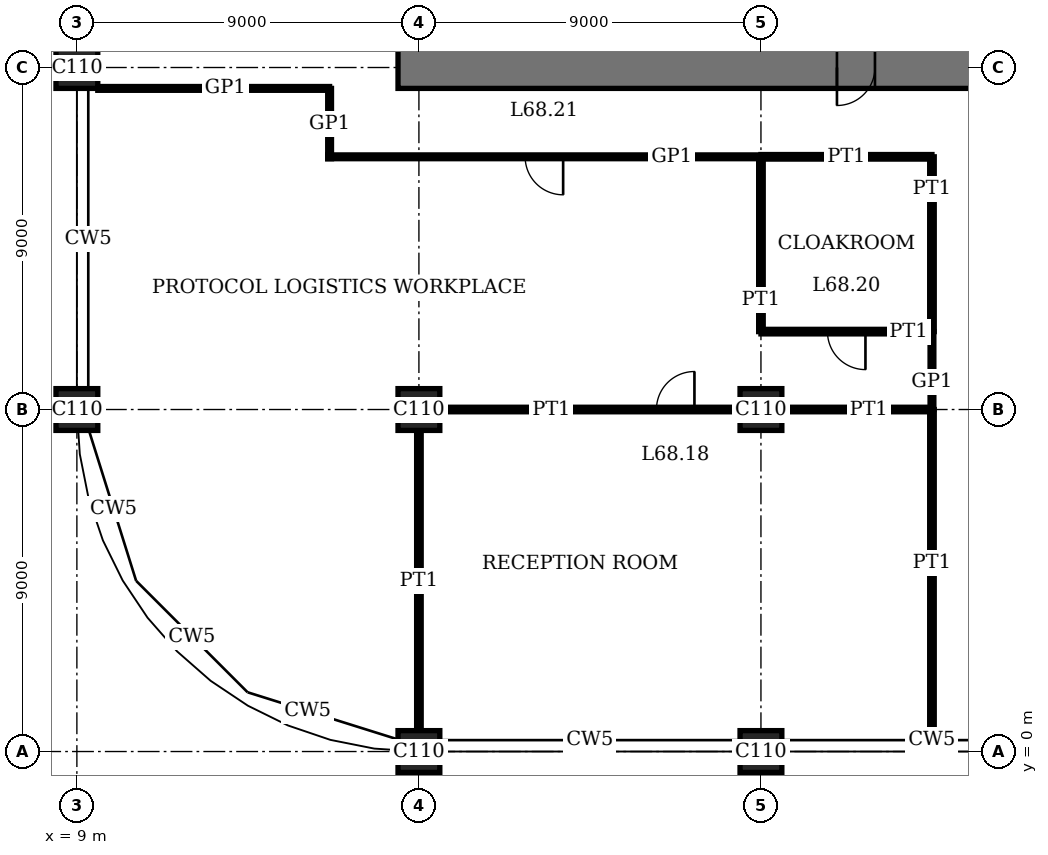
"""IFC4 building model, lengths in metres.
Left out: names, types, materials, properties, quantities, classifications, styles, units other than length and angle.
Written with IfcOpenShell. Run it as: python <this file> out.ifc"""

import sys

from ifc_helpers import new_model, si_unit, direction, frame, frame_2d, origin, origin_2d, place, context, subcontext, project, spatial, rectangle, extrude, element, fill, save


model = new_model("IFC4")
c1 = context("Model", 3, precision=1e-05, world=origin(), true_north=direction((0.0, 1.0)))
c2 = subcontext(c1, "Body", "Model", "MODEL_VIEW")
j1 = project(units=[si_unit("LENGTHUNIT", "METRE"), si_unit("PLANEANGLEUNIT", "RADIAN")], contexts=[c1])
p1 = place(None, origin())
s1 = spatial("IfcSite", under=j1, at=p1, CompositionType="ELEMENT")
p2 = place(p1, origin())
s2 = spatial("IfcBuilding", under=s1, at=p2, CompositionType="ELEMENT")
p3 = place(p2, frame((0.0, 0.0, 279.4)))
s3 = spatial("IfcBuildingStorey", under=s2, at=p3, CompositionType="ELEMENT", Elevation=279.4)
for number, where, z_axis, x_axis in (
    (1, (9.0, 9.0, 0.0), (0.0, 0.0, 1.0), (1.0, 0.0, 0.0)),
    (2, (9.0, 18.0, 0.0), (0.0, 0.0, 1.0), (1.0, 0.0, 0.0)),
    (3, (18.0, 0.0, 0.0), (0.0, 0.0, 1.0), (1.0, 0.0, 0.0)),
    (4, (18.0, 9.0, 0.0), (0.0, 0.0, 1.0), (1.0, 0.0, 0.0)),
    (5, (27.0, 0.0, 0.0), (0.0, 0.0, 1.0), (1.0, 0.0, 0.0)),
    (6, (27.0, 9.0, 0.0), (0.0, 0.0, 1.0), (1.0, 0.0, 0.0)),
):
    element("IfcColumn", number, at=place(p3, frame(where, z_axis=z_axis, x_axis=x_axis)), inside=s3, PredefinedType="COLUMN", context=c2, shape_type="SweptSolid", body=[
        extrude(rectangle(XDim=1.1, YDim=1.1, at=origin_2d()), origin(), (0.0, 0.0, 1.0), 4.0),
    ])
p4 = place(p3, frame((17.45, 18.0, 0.0), z_axis=(0.0, 0.0, 1.0), x_axis=(1.0, 0.0, 0.0)))
e7 = element("IfcWall", 7, at=p4, inside=s3, PredefinedType="SHEAR", context=c2, shape_type="SweptSolid", body=[
    extrude(rectangle(XDim=28.1, YDim=1.1, at=frame_2d((14.05, 0.0))), origin(), (0.0, 0.0, 1.0), 4.0),
])
p5 = place(p4, frame((11.55, 0.0, 0.0)))
e8 = element("IfcOpeningElement", 8, at=p5, cuts=e7, PredefinedType="OPENING", context=c2, shape_type="SweptSolid", body=[
    extrude(rectangle(XDim=1.0, YDim=2.4, at=frame_2d((0.5, 1.2))), frame((0.0, 0.56, 0.0), z_axis=(0.0, -1.0, 0.0), x_axis=(1.0, 0.0, 0.0)), (0.0, 0.0, 1.0), 1.12),
])
p6 = place(p4, frame((16.55, 0.0, 0.0)))
e9 = element("IfcOpeningElement", 9, at=p6, cuts=e7, PredefinedType="OPENING", context=c2, shape_type="SweptSolid", body=[
    extrude(rectangle(XDim=1.0, YDim=2.4, at=frame_2d((0.5, 1.2))), frame((0.0, 0.56, 0.0), z_axis=(0.0, -1.0, 0.0), x_axis=(1.0, 0.0, 0.0)), (0.0, 0.0, 1.0), 1.12),
])
p7 = place(p4, frame((20.0, 0.0, 0.0)))
e10 = element("IfcOpeningElement", 10, at=p7, cuts=e7, PredefinedType="OPENING", context=c2, shape_type="SweptSolid", body=[
    extrude(rectangle(XDim=1.1, YDim=2.4, at=frame_2d((0.55, 1.2))), frame((0.0, 0.56, 0.0), z_axis=(0.0, -1.0, 0.0), x_axis=(1.0, 0.0, 0.0)), (0.0, 0.0, 1.0), 1.12),
])
p8 = place(p4, frame((24.05, 0.0, 0.0)))
e11 = element("IfcOpeningElement", 11, at=p8, cuts=e7, PredefinedType="OPENING", context=c2, shape_type="SweptSolid", body=[
    extrude(rectangle(XDim=1.0, YDim=2.4, at=frame_2d((0.5, 1.2))), frame((0.0, 0.56, 0.0), z_axis=(0.0, -1.0, 0.0), x_axis=(1.0, 0.0, 0.0)), (0.0, 0.0, 1.0), 1.12),
])
p9 = place(p3, frame((18.55, 9.0, 0.0), z_axis=(0.0, 0.0, 1.0), x_axis=(1.0, 0.0, 0.0)))
e12 = element("IfcWall", 12, at=p9, inside=s3, PredefinedType="PARTITIONING", context=c2, shape_type="SweptSolid", body=[
    extrude(rectangle(XDim=7.9, YDim=0.12, at=frame_2d((3.95, 0.0))), origin(), (0.0, 0.0, 1.0), 3.05),
])
p10 = place(p9, frame((5.7, 0.0, 0.0)))
e13 = element("IfcOpeningElement", 13, at=p10, cuts=e12, PredefinedType="OPENING", context=c2, shape_type="SweptSolid", body=[
    extrude(rectangle(XDim=1.0, YDim=2.4, at=frame_2d((0.5, 1.2))), frame((0.0, 0.07, 0.0), z_axis=(0.0, -1.0, 0.0), x_axis=(1.0, 0.0, 0.0)), (0.0, 0.0, 1.0), 0.14),
])
p11 = place(p3, frame((27.55, 9.0, 0.0), z_axis=(0.0, 0.0, 1.0), x_axis=(1.0, 0.0, 0.0)))
e14 = element("IfcWall", 14, at=p11, inside=s3, PredefinedType="PARTITIONING", context=c2, shape_type="SweptSolid", body=[
    extrude(rectangle(XDim=3.95, YDim=0.12, at=frame_2d((1.975, 0.0))), origin(), (0.0, 0.0, 1.0), 3.05),
])
p12 = place(p3, frame((27.0, 11.05, 0.0), z_axis=(0.0, 0.0, 1.0), x_axis=(1.0, 0.0, 0.0)))
e15 = element("IfcWall", 15, at=p12, inside=s3, PredefinedType="PARTITIONING", context=c2, shape_type="SweptSolid", body=[
    extrude(rectangle(XDim=4.5, YDim=0.12, at=frame_2d((2.25, 0.0))), origin(), (0.0, 0.0, 1.0), 3.75),
])
p13 = place(p12, frame((1.75, 0.0, 0.0)))
e16 = element("IfcOpeningElement", 16, at=p13, cuts=e15, PredefinedType="OPENING", context=c2, shape_type="SweptSolid", body=[
    extrude(rectangle(XDim=1.0, YDim=2.4, at=frame_2d((0.5, 1.2))), frame((0.0, 0.07, 0.0), z_axis=(0.0, -1.0, 0.0), x_axis=(1.0, 0.0, 0.0)), (0.0, 0.0, 1.0), 0.14),
])
p14 = place(p3, frame((27.0, 15.65, 0.0), z_axis=(0.0, 0.0, 1.0), x_axis=(1.0, 0.0, 0.0)))
e17 = element("IfcWall", 17, at=p14, inside=s3, PredefinedType="PARTITIONING", context=c2, shape_type="SweptSolid", body=[
    extrude(rectangle(XDim=4.5, YDim=0.12, at=frame_2d((2.25, 0.0))), origin(), (0.0, 0.0, 1.0), 3.75),
])
p15 = place(p3, frame((15.6, 15.65, 0.0), z_axis=(0.0, 0.0, 1.0), x_axis=(1.0, 0.0, 0.0)))
e18 = element("IfcWall", 18, at=p15, inside=s3, PredefinedType="PARTITIONING", context=c2, shape_type="SweptSolid", body=[
    extrude(rectangle(XDim=11.39, YDim=0.1, at=frame_2d((5.695, 0.0))), origin(), (0.0, 0.0, 1.0), 3.75),
])
p16 = place(p15, frame((5.195, 0.0, 0.0)))
e19 = element("IfcOpeningElement", 19, at=p16, cuts=e18, PredefinedType="OPENING", context=c2, shape_type="SweptSolid", body=[
    extrude(rectangle(XDim=1.0, YDim=2.4, at=frame_2d((0.5, 1.2))), frame((0.0, 0.06, 0.0), z_axis=(0.0, -1.0, 0.0), x_axis=(1.0, 0.0, 0.0)), (0.0, 0.0, 1.0), 0.12),
])
p17 = place(p3, frame((9.55, 17.45, 0.0), z_axis=(0.0, 0.0, 1.0), x_axis=(1.0, 0.0, 0.0)))
e20 = element("IfcWall", 20, at=p17, inside=s3, PredefinedType="PARTITIONING", context=c2, shape_type="SweptSolid", body=[
    extrude(rectangle(XDim=6.1, YDim=0.1, at=frame_2d((3.05, 0.0))), origin(), (0.0, 0.0, 1.0), 3.75),
])
p18 = place(p3, frame((15.65, 15.6, 0.0), z_axis=(0.0, 0.0, 1.0), x_axis=(0.0, 1.0, 0.0)))
e21 = element("IfcWall", 21, at=p18, inside=s3, PredefinedType="PARTITIONING", context=c2, shape_type="SweptSolid", body=[
    extrude(rectangle(XDim=1.85, YDim=0.1, at=frame_2d((0.925, 0.0))), origin(), (0.0, 0.0, 1.0), 3.75),
])
p19 = place(p3, frame((18.0, 0.55, 0.0), z_axis=(0.0, 0.0, 1.0), x_axis=(0.0, 1.0, 0.0)))
e22 = element("IfcWall", 22, at=p19, inside=s3, PredefinedType="PARTITIONING", context=c2, shape_type="SweptSolid", body=[
    extrude(rectangle(XDim=7.9, YDim=0.12, at=frame_2d((3.95, 0.0))), origin(), (0.0, 0.0, 1.0), 3.05),
])
p20 = place(p3, frame((27.0, 11.05, 0.0), z_axis=(0.0, 0.0, 1.0), x_axis=(0.0, 1.0, 0.0)))
e23 = element("IfcWall", 23, at=p20, inside=s3, PredefinedType="PARTITIONING", context=c2, shape_type="SweptSolid", body=[
    extrude(rectangle(XDim=4.6, YDim=0.12, at=frame_2d((2.3, 0.0))), origin(), (0.0, 0.0, 1.0), 3.05),
])
p21 = place(p3, frame((31.5, 0.31, 0.0), z_axis=(0.0, 0.0, 1.0), x_axis=(0.0, 1.0, 0.0)))
e24 = element("IfcWall", 24, at=p21, inside=s3, PredefinedType="PARTITIONING", context=c2, shape_type="SweptSolid", body=[
    extrude(rectangle(XDim=8.69, YDim=0.12, at=frame_2d((4.345, 0.0))), origin(), (0.0, 0.0, 1.0), 3.75),
])
p22 = place(p3, frame((31.5, 11.05, 0.0), z_axis=(0.0, 0.0, 1.0), x_axis=(0.0, 1.0, 0.0)))
e25 = element("IfcWall", 25, at=p22, inside=s3, PredefinedType="PARTITIONING", context=c2, shape_type="SweptSolid", body=[
    extrude(rectangle(XDim=4.6, YDim=0.12, at=frame_2d((2.3, 0.0))), origin(), (0.0, 0.0, 1.0), 3.75),
])
p23 = place(p3, frame((31.5, 9.0, 0.0), z_axis=(0.0, 0.0, 1.0), x_axis=(0.0, 1.0, 0.0)))
e26 = element("IfcWall", 26, at=p23, inside=s3, PredefinedType="PARTITIONING", context=c2, shape_type="SweptSolid", body=[
    extrude(rectangle(XDim=2.05, YDim=0.1, at=frame_2d((1.025, 0.0))), origin(), (0.0, 0.0, 1.0), 3.75),
])
p24 = place(p5, origin())
e27 = element("IfcDoor", 27, at=p24, inside=s3, OperationType="SINGLE_SWING_LEFT", PredefinedType="DOOR", context=c2, shape_type="SweptSolid", body=[
    extrude(rectangle(XDim=1.0, YDim=2.4, at=frame_2d((0.5, 1.2))), frame((0.0, 0.025, 0.0), z_axis=(0.0, -1.0, 0.0), x_axis=(1.0, 0.0, 0.0)), (0.0, 0.0, 1.0), 0.05),
    extrude(rectangle(XDim=0.04, YDim=2.4, at=frame_2d((0.02, 1.2))), frame((0.0, 0.4, 0.0), z_axis=(0.0, -1.0, 0.0), x_axis=(1.0, 0.0, 0.0)), (0.0, 0.0, 1.0), 0.8),
    extrude(rectangle(XDim=0.04, YDim=2.4, at=frame_2d((0.98, 1.2))), frame((0.0, 0.4, 0.0), z_axis=(0.0, -1.0, 0.0), x_axis=(1.0, 0.0, 0.0)), (0.0, 0.0, 1.0), 0.8),
    extrude(rectangle(XDim=1.0, YDim=0.04, at=frame_2d((0.5, 2.38))), frame((0.0, 0.4, 0.0), z_axis=(0.0, -1.0, 0.0), x_axis=(1.0, 0.0, 0.0)), (0.0, 0.0, 1.0), 0.8),
])
fill(e8, e27)
p25 = place(p10, origin())
e28 = element("IfcDoor", 28, at=p25, inside=s3, OperationType="SINGLE_SWING_LEFT", PredefinedType="DOOR", context=c2, shape_type="SweptSolid", body=[
    extrude(rectangle(XDim=1.0, YDim=2.4, at=frame_2d((0.5, 1.2))), frame((0.0, 0.025, 0.0), z_axis=(0.0, -1.0, 0.0), x_axis=(1.0, 0.0, 0.0)), (0.0, 0.0, 1.0), 0.05),
])
fill(e13, e28)
p26 = place(p13, origin())
e29 = element("IfcDoor", 29, at=p26, inside=s3, OperationType="SINGLE_SWING_RIGHT", PredefinedType="DOOR", context=c2, shape_type="SweptSolid", body=[
    extrude(rectangle(XDim=1.0, YDim=2.4, at=frame_2d((0.5, 1.2))), frame((0.0, 0.025, 0.0), z_axis=(0.0, -1.0, 0.0), x_axis=(1.0, 0.0, 0.0)), (0.0, 0.0, 1.0), 0.05),
])
fill(e16, e29)
p27 = place(p16, origin())
e30 = element("IfcDoor", 30, at=p27, inside=s3, OperationType="SINGLE_SWING_RIGHT", PredefinedType="DOOR", context=c2, shape_type="SweptSolid", body=[
    extrude(rectangle(XDim=1.0, YDim=2.4, at=frame_2d((0.5, 1.2))), frame((0.0, 0.02, 0.0), z_axis=(0.0, -1.0, 0.0), x_axis=(1.0, 0.0, 0.0)), (0.0, 0.0, 1.0), 0.04),
])
fill(e19, e30)
save(model, sys.argv[1])
